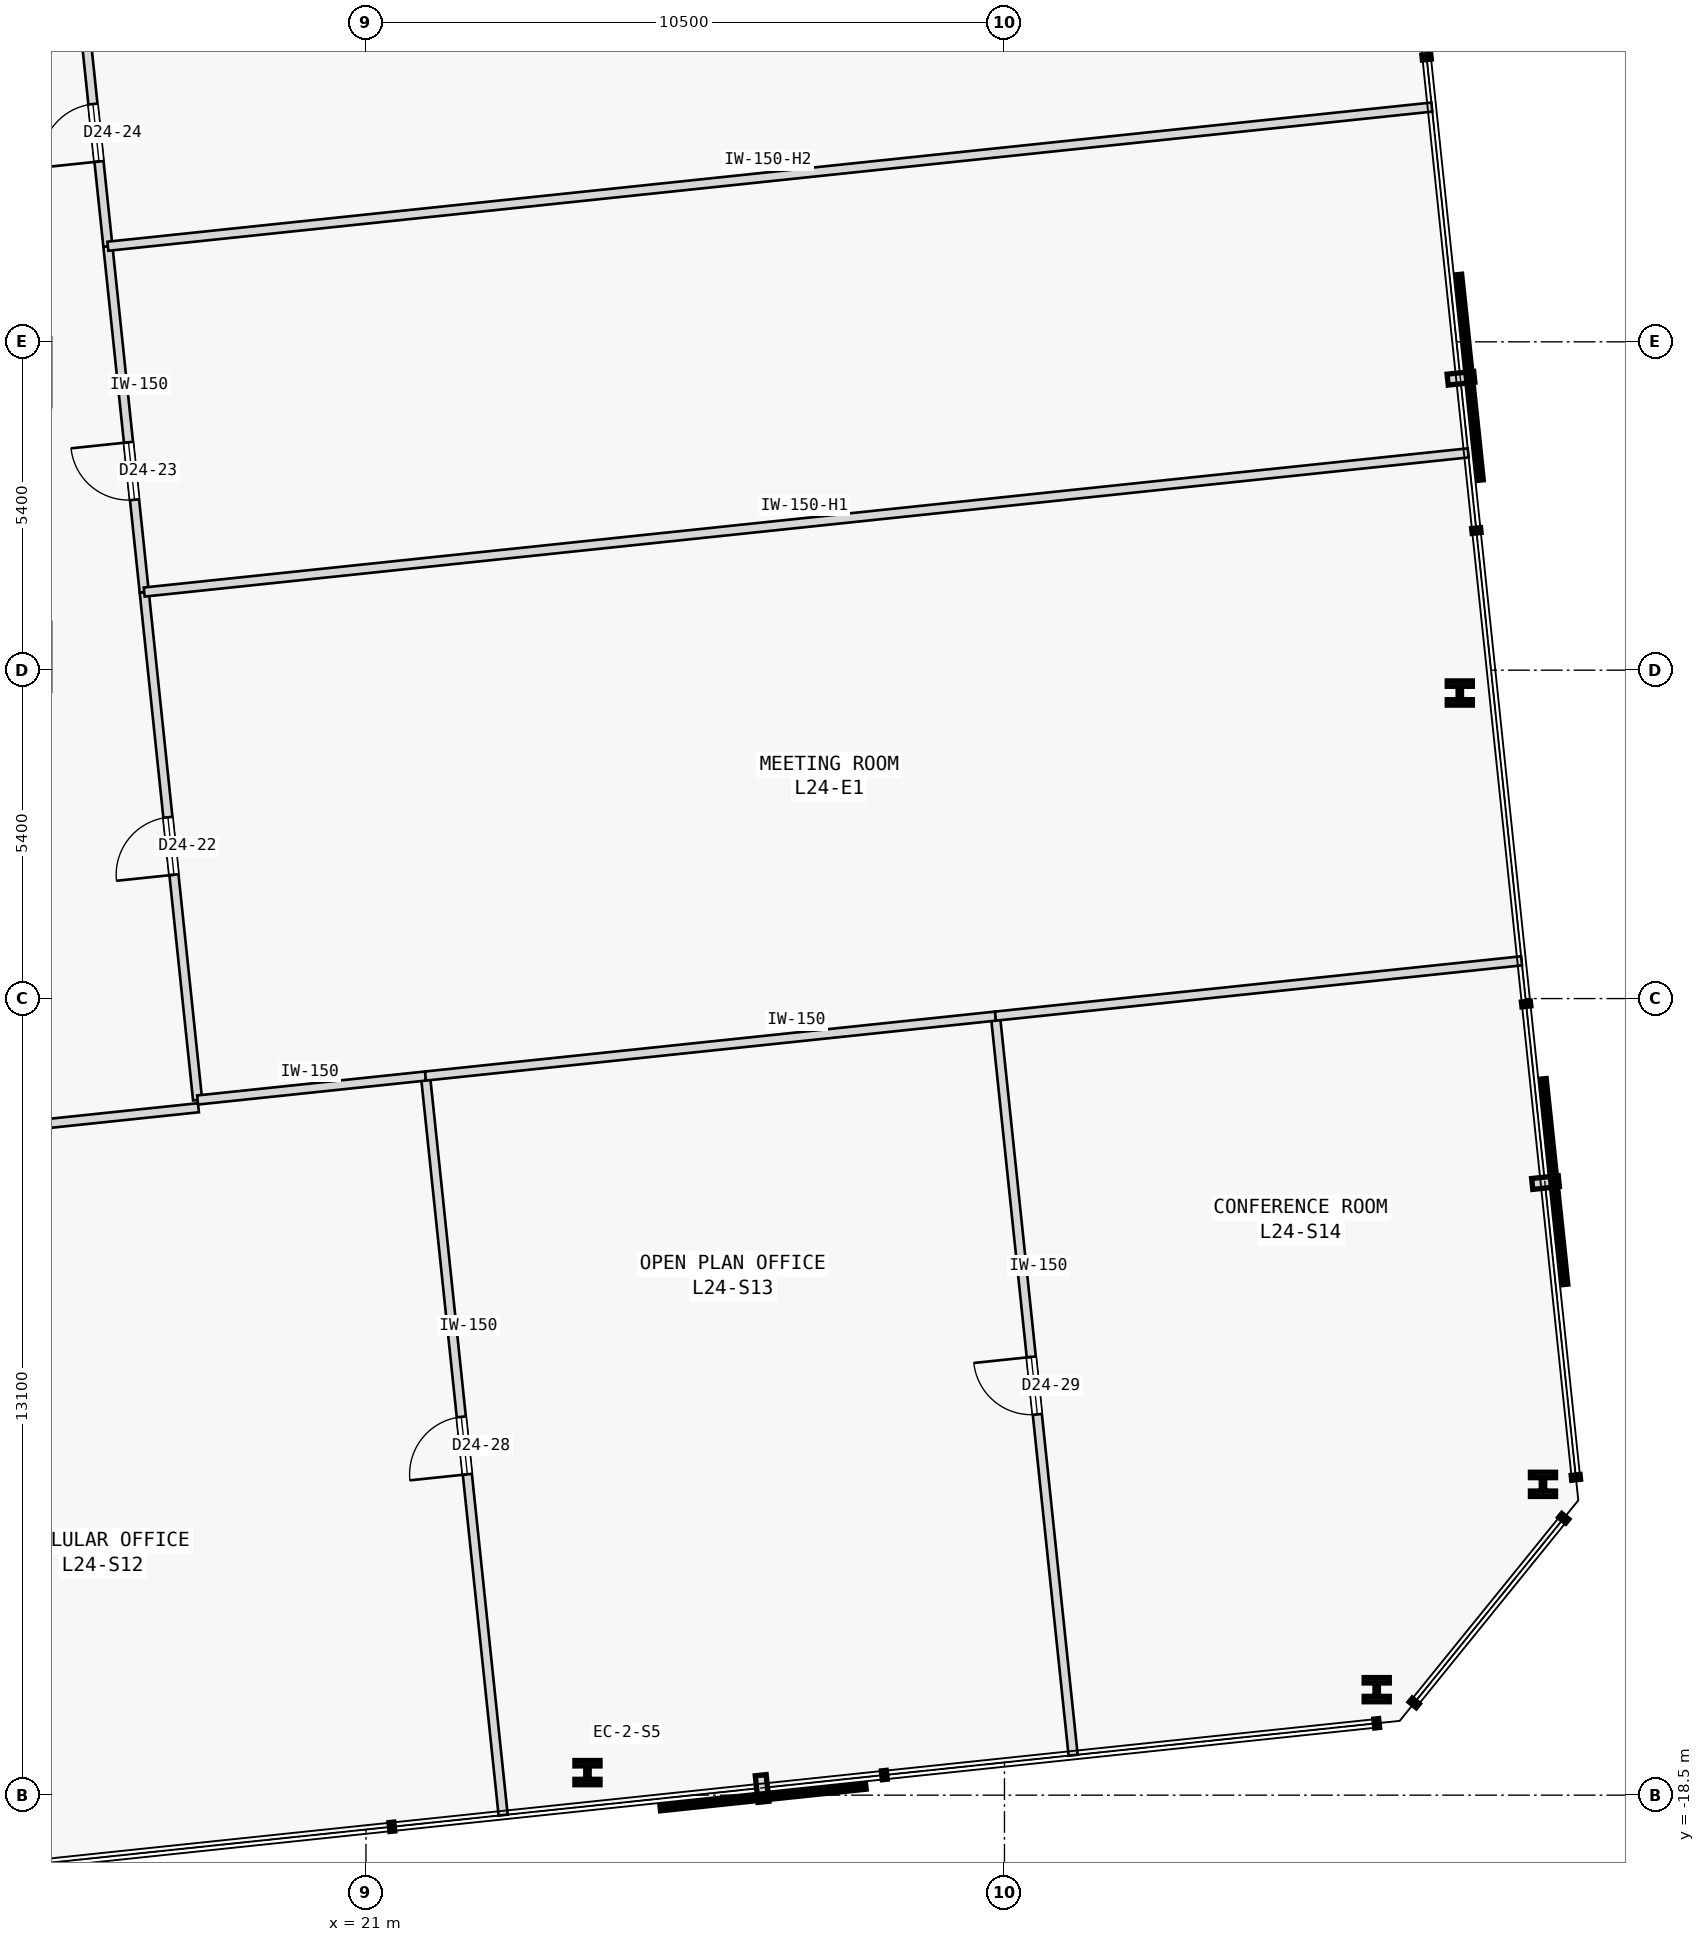
"""IFC4 building model, lengths in metres.
Left out: names, types, materials, properties, quantities, classifications, styles, units other than length and angle.
Written with IfcOpenShell. Run it as: python <this file> out.ifc"""

import sys

from ifc_helpers import new_model, si_unit, direction, frame, frame_2d, origin, origin_2d, place, context, subcontext, project, spatial, rectangle, i_section, extrude, element, fill, save


model = new_model("IFC4")
c1 = context("Model", 3, precision=1e-05, world=origin(), true_north=direction((0.0, 1.0)))
c2 = subcontext(c1, "Body", "Model", "MODEL_VIEW")
j1 = project(units=[si_unit("LENGTHUNIT", "METRE"), si_unit("PLANEANGLEUNIT", "RADIAN")], contexts=[c1])
p1 = place(None, origin())
s1 = spatial("IfcSite", under=j1, at=p1, CompositionType="ELEMENT")
p2 = place(p1, origin())
s2 = spatial("IfcBuilding", under=s1, at=p2, CompositionType="ELEMENT")
p3 = place(p2, frame((0.0, 0.0, 98.5)))
s3 = spatial("IfcBuildingStorey", under=s2, at=p3, CompositionType="ELEMENT", Elevation=98.5)
for number, where, z_axis, x_axis in (
    (1, (24.642, -18.129, 0.0), (0.0, 0.0, 1.0), (1.0, 0.0, 0.0)),
    (2, (37.622, -16.765, 0.0), (0.0, 0.0, 1.0), (1.0, 0.0, 0.0)),
    (3, (40.356, -13.389, 0.0), (0.0, 0.0, 1.0), (1.0, 0.0, 0.0)),
    (4, (38.988, -0.375, 0.0), (0.0, 0.0, 1.0), (1.0, 0.0, 0.0)),
):
    element("IfcColumn", number, at=place(p3, frame(where, z_axis=z_axis, x_axis=x_axis)), inside=s3, PredefinedType="COLUMN", context=c2, shape_type="SweptSolid", body=[
        extrude(i_section(OverallWidth=0.413, OverallDepth=0.398, WebThickness=0.056, FlangeThickness=0.089, FilletRadius=0.015, at=origin_2d()), origin(), (0.0, 0.0, 1.0), 3.7),
    ])
p4 = place(p3, frame((11.177, -7.938, 0.0), z_axis=(0.0, 0.0, 1.0), x_axis=(0.994525011473, 0.104498811264, 0.0)))
e5 = element("IfcWall", 5, at=p4, inside=s3, PredefinedType="PARTITIONING", context=c2, shape_type="SweptSolid", body=[
    extrude(rectangle(XDim=7.107, YDim=0.15, at=frame_2d((3.553, 0.0))), origin(), (0.0, 0.0, 1.0), 3.475),
])
p5 = place(p4, frame((3.079, 0.0, 0.0)))
e6 = element("IfcOpeningElement", 6, at=p5, cuts=e5, PredefinedType="OPENING", context=c2, shape_type="SweptSolid", body=[
    extrude(rectangle(XDim=0.95, YDim=2.15, at=frame_2d((0.475, 1.075))), frame((0.0, 0.085, 0.0), z_axis=(0.0, -1.0, 0.0), x_axis=(1.0, 0.0, 0.0)), (0.0, 0.0, 1.0), 0.17),
])
p6 = place(p3, frame((18.231, -7.068, 0.0), z_axis=(0.0, 0.0, 1.0), x_axis=(-0.104527419485, 0.994522005074, 0.0)))
e7 = element("IfcWall", 7, at=p6, inside=s3, PredefinedType="PARTITIONING", context=c2, shape_type="SweptSolid", body=[
    extrude(rectangle(XDim=8.399, YDim=0.15, at=frame_2d((4.199, 0.0))), origin(), (0.0, 0.0, 1.0), 3.475),
])
p7 = place(p6, frame((3.725, 0.0, 0.0)))
e8 = element("IfcOpeningElement", 8, at=p7, cuts=e7, PredefinedType="OPENING", context=c2, shape_type="SweptSolid", body=[
    extrude(rectangle(XDim=0.95, YDim=2.15, at=frame_2d((0.475, 1.075))), frame((0.0, 0.085, 0.0), z_axis=(0.0, -1.0, 0.0), x_axis=(1.0, 0.0, 0.0)), (0.0, 0.0, 1.0), 0.17),
])
p8 = place(p3, frame((17.353, 1.285, 0.0), z_axis=(0.0, 0.0, 1.0), x_axis=(-0.104524753323, 0.994522285292, 0.0)))
e9 = element("IfcWall", 9, at=p8, inside=s3, PredefinedType="PARTITIONING", context=c2, shape_type="SweptSolid", body=[
    extrude(rectangle(XDim=5.718, YDim=0.15, at=frame_2d((2.859, 0.0))), origin(), (0.0, 0.0, 1.0), 3.475),
])
p9 = place(p8, frame((1.526, 0.0, 0.0)))
e10 = element("IfcOpeningElement", 10, at=p9, cuts=e9, PredefinedType="OPENING", context=c2, shape_type="SweptSolid", body=[
    extrude(rectangle(XDim=0.95, YDim=2.15, at=frame_2d((0.475, 1.075))), frame((0.0, 0.085, 0.0), z_axis=(0.0, -1.0, 0.0), x_axis=(1.0, 0.0, 0.0)), (0.0, 0.0, 1.0), 0.17),
])
p10 = place(p3, frame((16.756, 6.972, 0.0), z_axis=(0.0, 0.0, 1.0), x_axis=(-0.104539173002, 0.994520769671, 0.0)))
e11 = element("IfcWall", 11, at=p10, inside=s3, PredefinedType="PARTITIONING", context=c2, shape_type="SweptSolid", body=[
    extrude(rectangle(XDim=3.753, YDim=0.15, at=frame_2d((1.876, 0.0))), origin(), (0.0, 0.0, 1.0), 3.475),
])
p11 = place(p10, frame((1.402, 0.0, 0.0)))
e12 = element("IfcOpeningElement", 12, at=p11, cuts=e11, PredefinedType="OPENING", context=c2, shape_type="SweptSolid", body=[
    extrude(rectangle(XDim=0.95, YDim=2.15, at=frame_2d((0.475, 1.075))), frame((0.0, 0.085, 0.0), z_axis=(0.0, -1.0, 0.0), x_axis=(1.0, 0.0, 0.0)), (0.0, 0.0, 1.0), 0.17),
])
p12 = place(p3, frame((23.256, -18.828, 0.0), z_axis=(0.0, 0.0, 1.0), x_axis=(-0.104540236679, 0.994520657862, 0.0)))
e13 = element("IfcWall", 13, at=p12, inside=s3, PredefinedType="PARTITIONING", context=c2, shape_type="SweptSolid", body=[
    extrude(rectangle(XDim=12.221, YDim=0.15, at=frame_2d((6.11, 0.0))), origin(), (0.0, 0.0, 1.0), 3.475),
])
p13 = place(p12, frame((5.635, 0.0, 0.0)))
e14 = element("IfcOpeningElement", 14, at=p13, cuts=e13, PredefinedType="OPENING", context=c2, shape_type="SweptSolid", body=[
    extrude(rectangle(XDim=0.95, YDim=2.15, at=frame_2d((0.475, 1.075))), frame((0.0, 0.085, 0.0), z_axis=(0.0, -1.0, 0.0), x_axis=(1.0, 0.0, 0.0)), (0.0, 0.0, 1.0), 0.17),
])
p14 = place(p3, frame((18.231, -7.068, 0.0), z_axis=(0.0, 0.0, 1.0), x_axis=(0.99452354487, 0.10451276812, 0.0)))
e15 = element("IfcWall", 15, at=p14, inside=s3, PredefinedType="PARTITIONING", context=c2, shape_type="SweptSolid", body=[
    extrude(rectangle(XDim=3.768, YDim=0.15, at=frame_2d((1.884, 0.0))), origin(), (0.0, 0.0, 1.0), 3.475),
])
p15 = place(p3, frame((32.629, -17.843, 0.0), z_axis=(0.0, 0.0, 1.0), x_axis=(-0.104538159751, 0.994520876179, 0.0)))
e16 = element("IfcWall", 16, at=p15, inside=s3, PredefinedType="PARTITIONING", context=c2, shape_type="SweptSolid", body=[
    extrude(rectangle(XDim=12.221, YDim=0.15, at=frame_2d((6.111, 0.0))), origin(), (0.0, 0.0, 1.0), 3.475),
])
p16 = place(p15, frame((5.635, 0.0, 0.0)))
e17 = element("IfcOpeningElement", 17, at=p16, cuts=e16, PredefinedType="OPENING", context=c2, shape_type="SweptSolid", body=[
    extrude(rectangle(XDim=0.95, YDim=2.15, at=frame_2d((0.475, 1.075))), frame((0.0, 0.085, 0.0), z_axis=(0.0, -1.0, 0.0), x_axis=(1.0, 0.0, 0.0)), (0.0, 0.0, 1.0), 0.17),
])
p17 = place(p3, frame((21.979, -6.674, 0.0), z_axis=(0.0, 0.0, 1.0), x_axis=(0.994519921083, 0.10454724563, 0.0)))
e18 = element("IfcWall", 18, at=p17, inside=s3, PredefinedType="PARTITIONING", context=c2, shape_type="SweptSolid", body=[
    extrude(rectangle(XDim=9.425, YDim=0.15, at=frame_2d((4.712, 0.0))), origin(), (0.0, 0.0, 1.0), 3.475),
])
p18 = place(p3, frame((31.352, -5.689, 0.0), z_axis=(0.0, 0.0, 1.0), x_axis=(0.994521893041, 0.104528485415, 0.0)))
e19 = element("IfcWall", 19, at=p18, inside=s3, PredefinedType="PARTITIONING", context=c2, shape_type="SweptSolid", body=[
    extrude(rectangle(XDim=8.7, YDim=0.15, at=frame_2d((4.35, 0.0))), origin(), (0.0, 0.0, 1.0), 3.475),
])
p19 = place(p3, frame((17.353, 1.285, 0.0), z_axis=(0.0, 0.0, 1.0), x_axis=(0.994522365919, 0.104523986183, 0.0)))
e20 = element("IfcWall", 20, at=p19, inside=s3, PredefinedType="PARTITIONING", context=c2, shape_type="SweptSolid", body=[
    extrude(rectangle(XDim=21.893, YDim=0.15, at=frame_2d((10.946, 0.0))), origin(), (0.0, 0.0, 1.0), 3.025),
])
p20 = place(p3, frame((16.756, 6.972, 0.0), z_axis=(0.0, 0.0, 1.0), x_axis=(0.994521206634, 0.104535015934, 0.0)))
e21 = element("IfcWall", 21, at=p20, inside=s3, PredefinedType="PARTITIONING", context=c2, shape_type="SweptSolid", body=[
    extrude(rectangle(XDim=21.893, YDim=0.15, at=frame_2d((10.946, 0.0))), origin(), (0.0, 0.0, 1.0), 2.875),
])
p21 = place(p7, origin())
e22 = element("IfcDoor", 22, at=p21, inside=s3, OperationType="SINGLE_SWING_LEFT", PredefinedType="DOOR", context=c2, shape_type="SweptSolid", body=[
    extrude(rectangle(XDim=0.95, YDim=2.15, at=frame_2d((0.475, 1.075))), frame((0.0, 0.025, 0.0), z_axis=(0.0, -1.0, 0.0), x_axis=(1.0, 0.0, 0.0)), (0.0, 0.0, 1.0), 0.05),
])
fill(e8, e22)
p22 = place(p9, origin())
e23 = element("IfcDoor", 23, at=p22, inside=s3, OperationType="SINGLE_SWING_RIGHT", PredefinedType="DOOR", context=c2, shape_type="SweptSolid", body=[
    extrude(rectangle(XDim=0.95, YDim=2.15, at=frame_2d((0.475, 1.075))), frame((0.0, 0.025, 0.0), z_axis=(0.0, -1.0, 0.0), x_axis=(1.0, 0.0, 0.0)), (0.0, 0.0, 1.0), 0.05),
])
fill(e10, e23)
p23 = place(p11, origin())
e24 = element("IfcDoor", 24, at=p23, inside=s3, OperationType="SINGLE_SWING_LEFT", PredefinedType="DOOR", context=c2, shape_type="SweptSolid", body=[
    extrude(rectangle(XDim=0.95, YDim=2.15, at=frame_2d((0.475, 1.075))), frame((0.0, 0.025, 0.0), z_axis=(0.0, -1.0, 0.0), x_axis=(1.0, 0.0, 0.0)), (0.0, 0.0, 1.0), 0.05),
])
fill(e12, e24)
p24 = place(p13, origin())
e25 = element("IfcDoor", 25, at=p24, inside=s3, OperationType="SINGLE_SWING_LEFT", PredefinedType="DOOR", context=c2, shape_type="SweptSolid", body=[
    extrude(rectangle(XDim=0.95, YDim=2.15, at=frame_2d((0.475, 1.075))), frame((0.0, 0.025, 0.0), z_axis=(0.0, -1.0, 0.0), x_axis=(1.0, 0.0, 0.0)), (0.0, 0.0, 1.0), 0.05),
])
fill(e14, e25)
p25 = place(p16, origin())
e26 = element("IfcDoor", 26, at=p25, inside=s3, OperationType="SINGLE_SWING_RIGHT", PredefinedType="DOOR", context=c2, shape_type="SweptSolid", body=[
    extrude(rectangle(XDim=0.95, YDim=2.15, at=frame_2d((0.475, 1.075))), frame((0.0, 0.025, 0.0), z_axis=(0.0, -1.0, 0.0), x_axis=(1.0, 0.0, 0.0)), (0.0, 0.0, 1.0), 0.05),
])
fill(e17, e26)
save(model, sys.argv[1])
